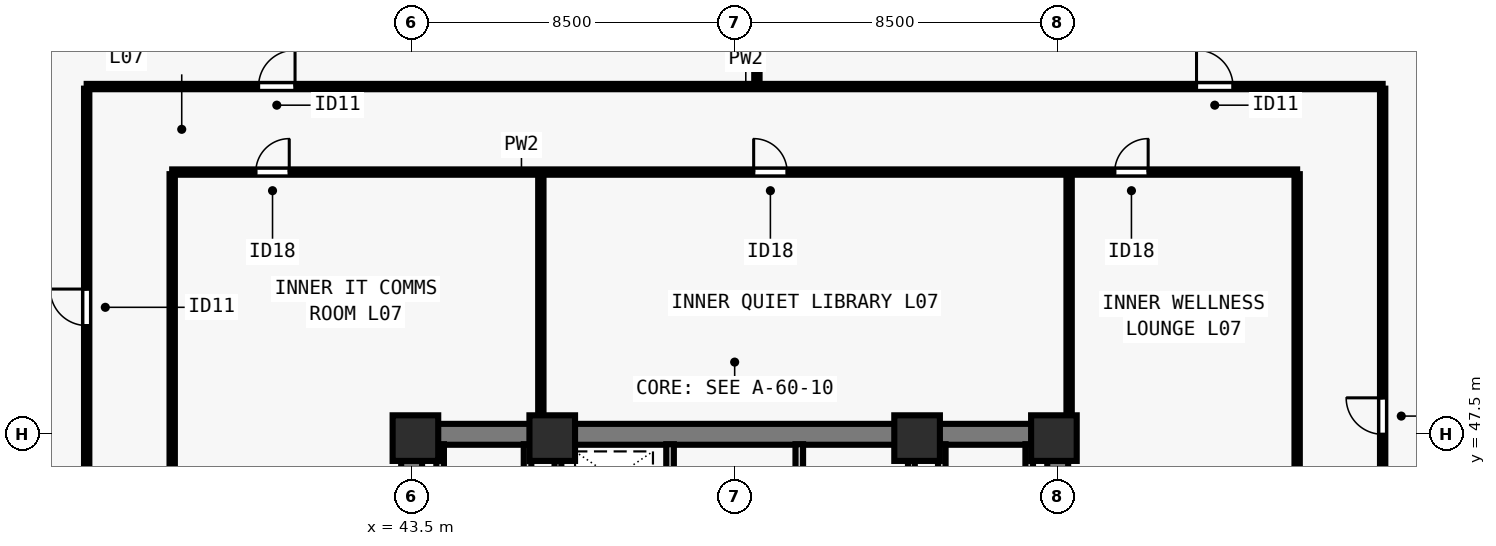
"""IFC4 building model, lengths in metres.
Left out: names, types, materials, properties, quantities, classifications, styles, units other than length and angle.
Written with IfcOpenShell. Run it as: python <this file> out.ifc"""

import sys

from ifc_helpers import new_model, si_unit, direction, frame, frame_2d, origin, origin_2d, place, context, subcontext, project, spatial, rectangle, extrude, element, fill, save


model = new_model("IFC4")
c1 = context("Model", 3, precision=1e-05, world=origin(), true_north=direction((0.0, 1.0)))
c2 = subcontext(c1, "Body", "Model", "MODEL_VIEW")
j1 = project(units=[si_unit("LENGTHUNIT", "METRE"), si_unit("PLANEANGLEUNIT", "RADIAN")], contexts=[c1])
p1 = place(None, origin())
s1 = spatial("IfcSite", under=j1, at=p1, CompositionType="ELEMENT")
p2 = place(p1, origin())
s2 = spatial("IfcBuilding", under=s1, at=p2, CompositionType="ELEMENT")
p3 = place(p2, frame((0.0, 0.0, 30.5)))
s3 = spatial("IfcBuildingStorey", under=s2, at=p3, CompositionType="ELEMENT", Elevation=30.5)
for number, where, z_axis, x_axis in (
    (1, (43.6, 47.4, 0.0), (0.0, 0.0, 1.0), (1.0, 0.0, 0.0)),
    (2, (47.2, 47.4, 0.0), (0.0, 0.0, 1.0), (1.0, 0.0, 0.0)),
    (3, (56.8, 47.4, 0.0), (0.0, 0.0, 1.0), (1.0, 0.0, 0.0)),
    (4, (60.4, 47.4, 0.0), (0.0, 0.0, 1.0), (1.0, 0.0, 0.0)),
):
    element("IfcColumn", number, at=place(p3, frame(where, z_axis=z_axis, x_axis=x_axis)), inside=s3, PredefinedType="COLUMN", context=c2, shape_type="SweptSolid", body=[
        extrude(rectangle(XDim=1.2, YDim=1.2, at=origin_2d()), origin(), (0.0, 0.0, 1.0), 3.5),
    ])
p4 = place(p3, frame((43.225, 47.5, 0.0), z_axis=(0.0, 0.0, 1.0), x_axis=(1.0, 0.0, 0.0)))
e5 = element("IfcWall", 5, at=p4, inside=s3, PredefinedType="SHEAR", context=c2, shape_type="SweptSolid", body=[
    extrude(rectangle(XDim=17.55, YDim=0.55, at=frame_2d((8.775, 0.0))), origin(), (0.0, 0.0, 1.0), 3.28),
])
for number, where, z_axis, x_axis in (
    (6, (43.5, 40.8, 0.0), (0.0, 0.0, 1.0), (0.0, 1.0, 0.0)),
    (7, (60.5, 40.8, 0.0), (0.0, 0.0, 1.0), (0.0, 1.0, 0.0)),
):
    element("IfcWall", number, at=place(p3, frame(where, z_axis=z_axis, x_axis=x_axis)), inside=s3, PredefinedType="SHEAR", context=c2, shape_type="SweptSolid", body=[
        extrude(rectangle(XDim=6.435, YDim=0.55, at=frame_2d((3.218, 0.0))), origin(), (0.0, 0.0, 1.0), 3.28),
    ])
p5 = place(p3, frame((50.3, 40.585, 0.0), z_axis=(0.0, 0.0, 1.0), x_axis=(0.0, 1.0, 0.0)))
e8 = element("IfcWall", 8, at=p5, inside=s3, PredefinedType="SOLIDWALL", context=c2, shape_type="SweptSolid", body=[
    extrude(rectangle(XDim=6.655, YDim=0.2, at=frame_2d((3.328, 0.0))), origin(), (0.0, 0.0, 1.0), 3.28),
])
p6 = place(p5, frame((5.065, 0.0, 0.0)))
e9 = element("IfcOpeningElement", 9, at=p6, cuts=e8, PredefinedType="OPENING", context=c2, shape_type="SweptSolid", body=[
    extrude(rectangle(XDim=0.8, YDim=2.08, at=frame_2d((0.4, 1.04))), frame((0.0, 0.11, 0.0), z_axis=(0.0, -1.0, 0.0), x_axis=(1.0, 0.0, 0.0)), (0.0, 0.0, 1.0), 0.22),
])
p7 = place(p3, frame((53.7, 40.585, 0.0), z_axis=(0.0, 0.0, 1.0), x_axis=(0.0, 1.0, 0.0)))
e10 = element("IfcWall", 10, at=p7, inside=s3, PredefinedType="SOLIDWALL", context=c2, shape_type="SweptSolid", body=[
    extrude(rectangle(XDim=6.655, YDim=0.2, at=frame_2d((3.328, 0.0))), origin(), (0.0, 0.0, 1.0), 3.28),
])
p8 = place(p7, frame((0.195, 0.0, 0.0)))
e11 = element("IfcOpeningElement", 11, at=p8, cuts=e10, PredefinedType="OPENING", context=c2, shape_type="SweptSolid", body=[
    extrude(rectangle(XDim=0.8, YDim=2.08, at=frame_2d((0.4, 1.04))), frame((0.0, 0.11, 0.0), z_axis=(0.0, -1.0, 0.0), x_axis=(1.0, 0.0, 0.0)), (0.0, 0.0, 1.0), 0.22),
])
p9 = place(p7, frame((4.265, 0.0, 0.0)))
e12 = element("IfcOpeningElement", 12, at=p9, cuts=e10, PredefinedType="OPENING", context=c2, shape_type="SweptSolid", body=[
    extrude(rectangle(XDim=0.95, YDim=2.12, at=frame_2d((0.475, 1.06))), frame((0.0, 0.11, 0.0), z_axis=(0.0, -1.0, 0.0), x_axis=(1.0, 0.0, 0.0)), (0.0, 0.0, 1.0), 0.22),
])
for number, where, z_axis, x_axis in (
    (13, (46.55, 43.735, 0.0), (0.0, 0.0, 1.0), (0.0, 1.0, 0.0)),
    (14, (44.25, 43.735, 0.0), (0.0, 0.0, 1.0), (0.0, 1.0, 0.0)),
    (15, (57.45, 43.735, 0.0), (0.0, 0.0, 1.0), (0.0, 1.0, 0.0)),
    (16, (59.75, 43.735, 0.0), (0.0, 0.0, 1.0), (0.0, 1.0, 0.0)),
):
    element("IfcWall", number, at=place(p3, frame(where, z_axis=z_axis, x_axis=x_axis)), inside=s3, PredefinedType="SOLIDWALL", context=c2, shape_type="SweptSolid", body=[
        extrude(rectangle(XDim=3.505, YDim=0.2, at=frame_2d((1.752, 0.0))), origin(), (0.0, 0.0, 1.0), 3.28),
    ])
for number, where, z_axis, x_axis in (
    (17, (47.35, 43.735, 0.0), (0.0, 0.0, 1.0), (0.0, 1.0, 0.0)),
    (18, (56.65, 43.735, 0.0), (0.0, 0.0, 1.0), (0.0, 1.0, 0.0)),
):
    element("IfcWall", number, at=place(p3, frame(where, z_axis=z_axis, x_axis=x_axis)), inside=s3, PredefinedType="SOLIDWALL", context=c2, shape_type="SweptSolid", body=[
        extrude(rectangle(XDim=3.505, YDim=0.18, at=frame_2d((1.752, 0.0))), origin(), (0.0, 0.0, 1.0), 3.28),
    ])
p10 = place(p3, frame((34.95, 56.65, 0.0), z_axis=(0.0, 0.0, 1.0), x_axis=(1.0, 0.0, 0.0)))
e19 = element("IfcWall", 19, at=p10, inside=s3, PredefinedType="PARTITIONING", context=c2, shape_type="SweptSolid", body=[
    extrude(rectangle(XDim=34.1, YDim=0.14, at=frame_2d((17.05, 0.0))), origin(), (0.0, 0.0, 1.0), 3.28),
])
p11 = place(p10, frame((4.522, 0.0, 0.0)))
e20 = element("IfcOpeningElement", 20, at=p11, cuts=e19, PredefinedType="OPENING", context=c2, shape_type="SweptSolid", body=[
    extrude(rectangle(XDim=0.96, YDim=2.12, at=frame_2d((0.48, 1.06))), frame((0.0, 0.08, 0.0), z_axis=(0.0, -1.0, 0.0), x_axis=(1.0, 0.0, 0.0)), (0.0, 0.0, 1.0), 0.16),
])
p12 = place(p10, frame((29.202, 0.0, 0.0)))
e21 = element("IfcOpeningElement", 21, at=p12, cuts=e19, PredefinedType="OPENING", context=c2, shape_type="SweptSolid", body=[
    extrude(rectangle(XDim=0.96, YDim=2.12, at=frame_2d((0.48, 1.06))), frame((0.0, 0.08, 0.0), z_axis=(0.0, -1.0, 0.0), x_axis=(1.0, 0.0, 0.0)), (0.0, 0.0, 1.0), 0.16),
])
p13 = place(p3, frame((34.95, 21.405, 0.0), z_axis=(0.0, 0.0, 1.0), x_axis=(0.0, 1.0, 0.0)))
e22 = element("IfcWall", 22, at=p13, inside=s3, PredefinedType="PARTITIONING", context=c2, shape_type="SweptSolid", body=[
    extrude(rectangle(XDim=35.19, YDim=0.14, at=frame_2d((17.595, 0.0))), origin(), (0.0, 0.0, 1.0), 3.28),
])
p14 = place(p13, frame((5.21, 0.0, 0.0)))
e23 = element("IfcOpeningElement", 23, at=p14, cuts=e22, PredefinedType="OPENING", context=c2, shape_type="SweptSolid", body=[
    extrude(rectangle(XDim=0.96, YDim=2.12, at=frame_2d((0.48, 1.06))), frame((0.0, 0.08, 0.0), z_axis=(0.0, -1.0, 0.0), x_axis=(1.0, 0.0, 0.0)), (0.0, 0.0, 1.0), 0.16),
])
p15 = place(p13, frame((17.052, 0.0, 0.0)))
e24 = element("IfcOpeningElement", 24, at=p15, cuts=e22, PredefinedType="OPENING", context=c2, shape_type="SweptSolid", body=[
    extrude(rectangle(XDim=0.96, YDim=2.12, at=frame_2d((0.48, 1.06))), frame((0.0, 0.08, 0.0), z_axis=(0.0, -1.0, 0.0), x_axis=(1.0, 0.0, 0.0)), (0.0, 0.0, 1.0), 0.16),
])
p16 = place(p13, frame((28.957, 0.0, 0.0)))
e25 = element("IfcOpeningElement", 25, at=p16, cuts=e22, PredefinedType="OPENING", context=c2, shape_type="SweptSolid", body=[
    extrude(rectangle(XDim=0.96, YDim=2.12, at=frame_2d((0.48, 1.06))), frame((0.0, 0.08, 0.0), z_axis=(0.0, -1.0, 0.0), x_axis=(1.0, 0.0, 0.0)), (0.0, 0.0, 1.0), 0.16),
])
p17 = place(p3, frame((69.05, 21.405, 0.0), z_axis=(0.0, 0.0, 1.0), x_axis=(0.0, 1.0, 0.0)))
e26 = element("IfcWall", 26, at=p17, inside=s3, PredefinedType="PARTITIONING", context=c2, shape_type="SweptSolid", body=[
    extrude(rectangle(XDim=35.19, YDim=0.14, at=frame_2d((17.595, 0.0))), origin(), (0.0, 0.0, 1.0), 3.28),
])
p18 = place(p17, frame((8.545, 0.0, 0.0)))
e27 = element("IfcOpeningElement", 27, at=p18, cuts=e26, PredefinedType="OPENING", context=c2, shape_type="SweptSolid", body=[
    extrude(rectangle(XDim=0.96, YDim=2.12, at=frame_2d((0.48, 1.06))), frame((0.0, 0.08, 0.0), z_axis=(0.0, -1.0, 0.0), x_axis=(1.0, 0.0, 0.0)), (0.0, 0.0, 1.0), 0.16),
])
p19 = place(p17, frame((26.095, 0.0, 0.0)))
e28 = element("IfcOpeningElement", 28, at=p19, cuts=e26, PredefinedType="OPENING", context=c2, shape_type="SweptSolid", body=[
    extrude(rectangle(XDim=0.96, YDim=2.12, at=frame_2d((0.48, 1.06))), frame((0.0, 0.08, 0.0), z_axis=(0.0, -1.0, 0.0), x_axis=(1.0, 0.0, 0.0)), (0.0, 0.0, 1.0), 0.16),
])
p20 = place(p3, frame((37.2, 54.4, 0.0), z_axis=(0.0, 0.0, 1.0), x_axis=(1.0, 0.0, 0.0)))
e29 = element("IfcWall", 29, at=p20, inside=s3, PredefinedType="PARTITIONING", context=c2, shape_type="SweptSolid", body=[
    extrude(rectangle(XDim=29.6, YDim=0.14, at=frame_2d((14.8, 0.0))), origin(), (0.0, 0.0, 1.0), 3.28),
])
p21 = place(p20, frame((2.2, 0.0, 0.0)))
e30 = element("IfcOpeningElement", 30, at=p21, cuts=e29, PredefinedType="OPENING", context=c2, shape_type="SweptSolid", body=[
    extrude(rectangle(XDim=0.88, YDim=2.1, at=frame_2d((0.44, 1.05))), frame((0.0, 0.08, 0.0), z_axis=(0.0, -1.0, 0.0), x_axis=(1.0, 0.0, 0.0)), (0.0, 0.0, 1.0), 0.16),
])
p22 = place(p20, frame((15.3, 0.0, 0.0)))
e31 = element("IfcOpeningElement", 31, at=p22, cuts=e29, PredefinedType="OPENING", context=c2, shape_type="SweptSolid", body=[
    extrude(rectangle(XDim=0.88, YDim=2.1, at=frame_2d((0.44, 1.05))), frame((0.0, 0.08, 0.0), z_axis=(0.0, -1.0, 0.0), x_axis=(1.0, 0.0, 0.0)), (0.0, 0.0, 1.0), 0.16),
])
p23 = place(p20, frame((24.8, 0.0, 0.0)))
e32 = element("IfcOpeningElement", 32, at=p23, cuts=e29, PredefinedType="OPENING", context=c2, shape_type="SweptSolid", body=[
    extrude(rectangle(XDim=0.88, YDim=2.1, at=frame_2d((0.44, 1.05))), frame((0.0, 0.08, 0.0), z_axis=(0.0, -1.0, 0.0), x_axis=(1.0, 0.0, 0.0)), (0.0, 0.0, 1.0), 0.16),
])
p24 = place(p3, frame((37.2, 40.8, 0.0), z_axis=(0.0, 0.0, 1.0), x_axis=(0.0, 1.0, 0.0)))
e33 = element("IfcWall", 33, at=p24, inside=s3, PredefinedType="PARTITIONING", context=c2, shape_type="SweptSolid", body=[
    extrude(rectangle(XDim=13.545, YDim=0.14, at=frame_2d((6.772, 0.0))), origin(), (0.0, 0.0, 1.0), 3.28),
])
p25 = place(p24, frame((2.5, 0.0, 0.0)))
e34 = element("IfcOpeningElement", 34, at=p25, cuts=e33, PredefinedType="OPENING", context=c2, shape_type="SweptSolid", body=[
    extrude(rectangle(XDim=0.88, YDim=2.1, at=frame_2d((0.44, 1.05))), frame((0.0, 0.08, 0.0), z_axis=(0.0, -1.0, 0.0), x_axis=(1.0, 0.0, 0.0)), (0.0, 0.0, 1.0), 0.16),
])
p26 = place(p3, frame((66.8, 40.8, 0.0), z_axis=(0.0, 0.0, 1.0), x_axis=(0.0, 1.0, 0.0)))
e35 = element("IfcWall", 35, at=p26, inside=s3, PredefinedType="PARTITIONING", context=c2, shape_type="SweptSolid", body=[
    extrude(rectangle(XDim=13.545, YDim=0.14, at=frame_2d((6.772, 0.0))), origin(), (0.0, 0.0, 1.0), 3.28),
])
p27 = place(p26, frame((2.5, 0.0, 0.0)))
e36 = element("IfcOpeningElement", 36, at=p27, cuts=e35, PredefinedType="OPENING", context=c2, shape_type="SweptSolid", body=[
    extrude(rectangle(XDim=0.88, YDim=2.1, at=frame_2d((0.44, 1.05))), frame((0.0, 0.08, 0.0), z_axis=(0.0, -1.0, 0.0), x_axis=(1.0, 0.0, 0.0)), (0.0, 0.0, 1.0), 0.16),
])
p28 = place(p3, frame((46.9, 47.76, 0.0), z_axis=(0.0, 0.0, 1.0), x_axis=(0.0, 1.0, 0.0)))
e37 = element("IfcWall", 37, at=p28, inside=s3, PredefinedType="PARTITIONING", context=c2, shape_type="SweptSolid", body=[
    extrude(rectangle(XDim=6.585, YDim=0.14, at=frame_2d((3.292, 0.0))), origin(), (0.0, 0.0, 1.0), 3.28),
])
p29 = place(p3, frame((60.8, 47.76, 0.0), z_axis=(0.0, 0.0, 1.0), x_axis=(0.0, 1.0, 0.0)))
e38 = element("IfcWall", 38, at=p29, inside=s3, PredefinedType="PARTITIONING", context=c2, shape_type="SweptSolid", body=[
    extrude(rectangle(XDim=6.585, YDim=0.14, at=frame_2d((3.292, 0.0))), origin(), (0.0, 0.0, 1.0), 2.439),
])
p30 = place(p3, frame((52.585, 56.75, 0.0), z_axis=(0.0, 0.0, 1.0), x_axis=(0.0, 1.0, 0.0)))
e39 = element("IfcWall", 39, at=p30, inside=s3, PredefinedType="PARTITIONING", context=c2, shape_type="SweptSolid", body=[
    extrude(rectangle(XDim=7.33, YDim=0.14, at=frame_2d((3.665, 0.0))), origin(), (0.0, 0.0, 1.0), 2.849),
])
p31 = place(p21, origin())
e40 = element("IfcDoor", 40, at=p31, inside=s3, OperationType="SINGLE_SWING_RIGHT", PredefinedType="DOOR", context=c2, shape_type="SweptSolid", body=[
    extrude(rectangle(XDim=0.88, YDim=2.1, at=frame_2d((0.44, 1.05))), frame((0.0, 0.025, 0.0), z_axis=(0.0, -1.0, 0.0), x_axis=(1.0, 0.0, 0.0)), (0.0, 0.0, 1.0), 0.05),
])
fill(e30, e40)
p32 = place(p22, origin())
e41 = element("IfcDoor", 41, at=p32, inside=s3, OperationType="SINGLE_SWING_LEFT", PredefinedType="DOOR", context=c2, shape_type="SweptSolid", body=[
    extrude(rectangle(XDim=0.88, YDim=2.1, at=frame_2d((0.44, 1.05))), frame((0.0, 0.025, 0.0), z_axis=(0.0, -1.0, 0.0), x_axis=(1.0, 0.0, 0.0)), (0.0, 0.0, 1.0), 0.05),
])
fill(e31, e41)
p33 = place(p23, origin())
e42 = element("IfcDoor", 42, at=p33, inside=s3, OperationType="SINGLE_SWING_RIGHT", PredefinedType="DOOR", context=c2, shape_type="SweptSolid", body=[
    extrude(rectangle(XDim=0.88, YDim=2.1, at=frame_2d((0.44, 1.05))), frame((0.0, 0.025, 0.0), z_axis=(0.0, -1.0, 0.0), x_axis=(1.0, 0.0, 0.0)), (0.0, 0.0, 1.0), 0.05),
])
fill(e32, e42)
p34 = place(p11, origin())
e43 = element("IfcDoor", 43, at=p34, inside=s3, OperationType="SINGLE_SWING_RIGHT", PredefinedType="DOOR", context=c2, shape_type="SweptSolid", body=[
    extrude(rectangle(XDim=0.96, YDim=2.12, at=frame_2d((0.48, 1.06))), frame((0.0, 0.025, 0.0), z_axis=(0.0, -1.0, 0.0), x_axis=(1.0, 0.0, 0.0)), (0.0, 0.0, 1.0), 0.05),
])
fill(e20, e43)
p35 = place(p12, origin())
e44 = element("IfcDoor", 44, at=p35, inside=s3, OperationType="SINGLE_SWING_LEFT", PredefinedType="DOOR", context=c2, shape_type="SweptSolid", body=[
    extrude(rectangle(XDim=0.96, YDim=2.12, at=frame_2d((0.48, 1.06))), frame((0.0, 0.025, 0.0), z_axis=(0.0, -1.0, 0.0), x_axis=(1.0, 0.0, 0.0)), (0.0, 0.0, 1.0), 0.05),
])
fill(e21, e44)
p36 = place(p16, origin())
e45 = element("IfcDoor", 45, at=p36, inside=s3, OperationType="SINGLE_SWING_RIGHT", PredefinedType="DOOR", context=c2, shape_type="SweptSolid", body=[
    extrude(rectangle(XDim=0.96, YDim=2.12, at=frame_2d((0.48, 1.06))), frame((0.0, 0.025, 0.0), z_axis=(0.0, -1.0, 0.0), x_axis=(1.0, 0.0, 0.0)), (0.0, 0.0, 1.0), 0.05),
])
fill(e25, e45)
p37 = place(p19, origin())
e46 = element("IfcDoor", 46, at=p37, inside=s3, OperationType="SINGLE_SWING_RIGHT", PredefinedType="DOOR", context=c2, shape_type="SweptSolid", body=[
    extrude(rectangle(XDim=0.96, YDim=2.12, at=frame_2d((0.48, 1.06))), frame((0.0, 0.025, 0.0), z_axis=(0.0, -1.0, 0.0), x_axis=(1.0, 0.0, 0.0)), (0.0, 0.0, 1.0), 0.05),
])
fill(e28, e46)
save(model, sys.argv[1])
